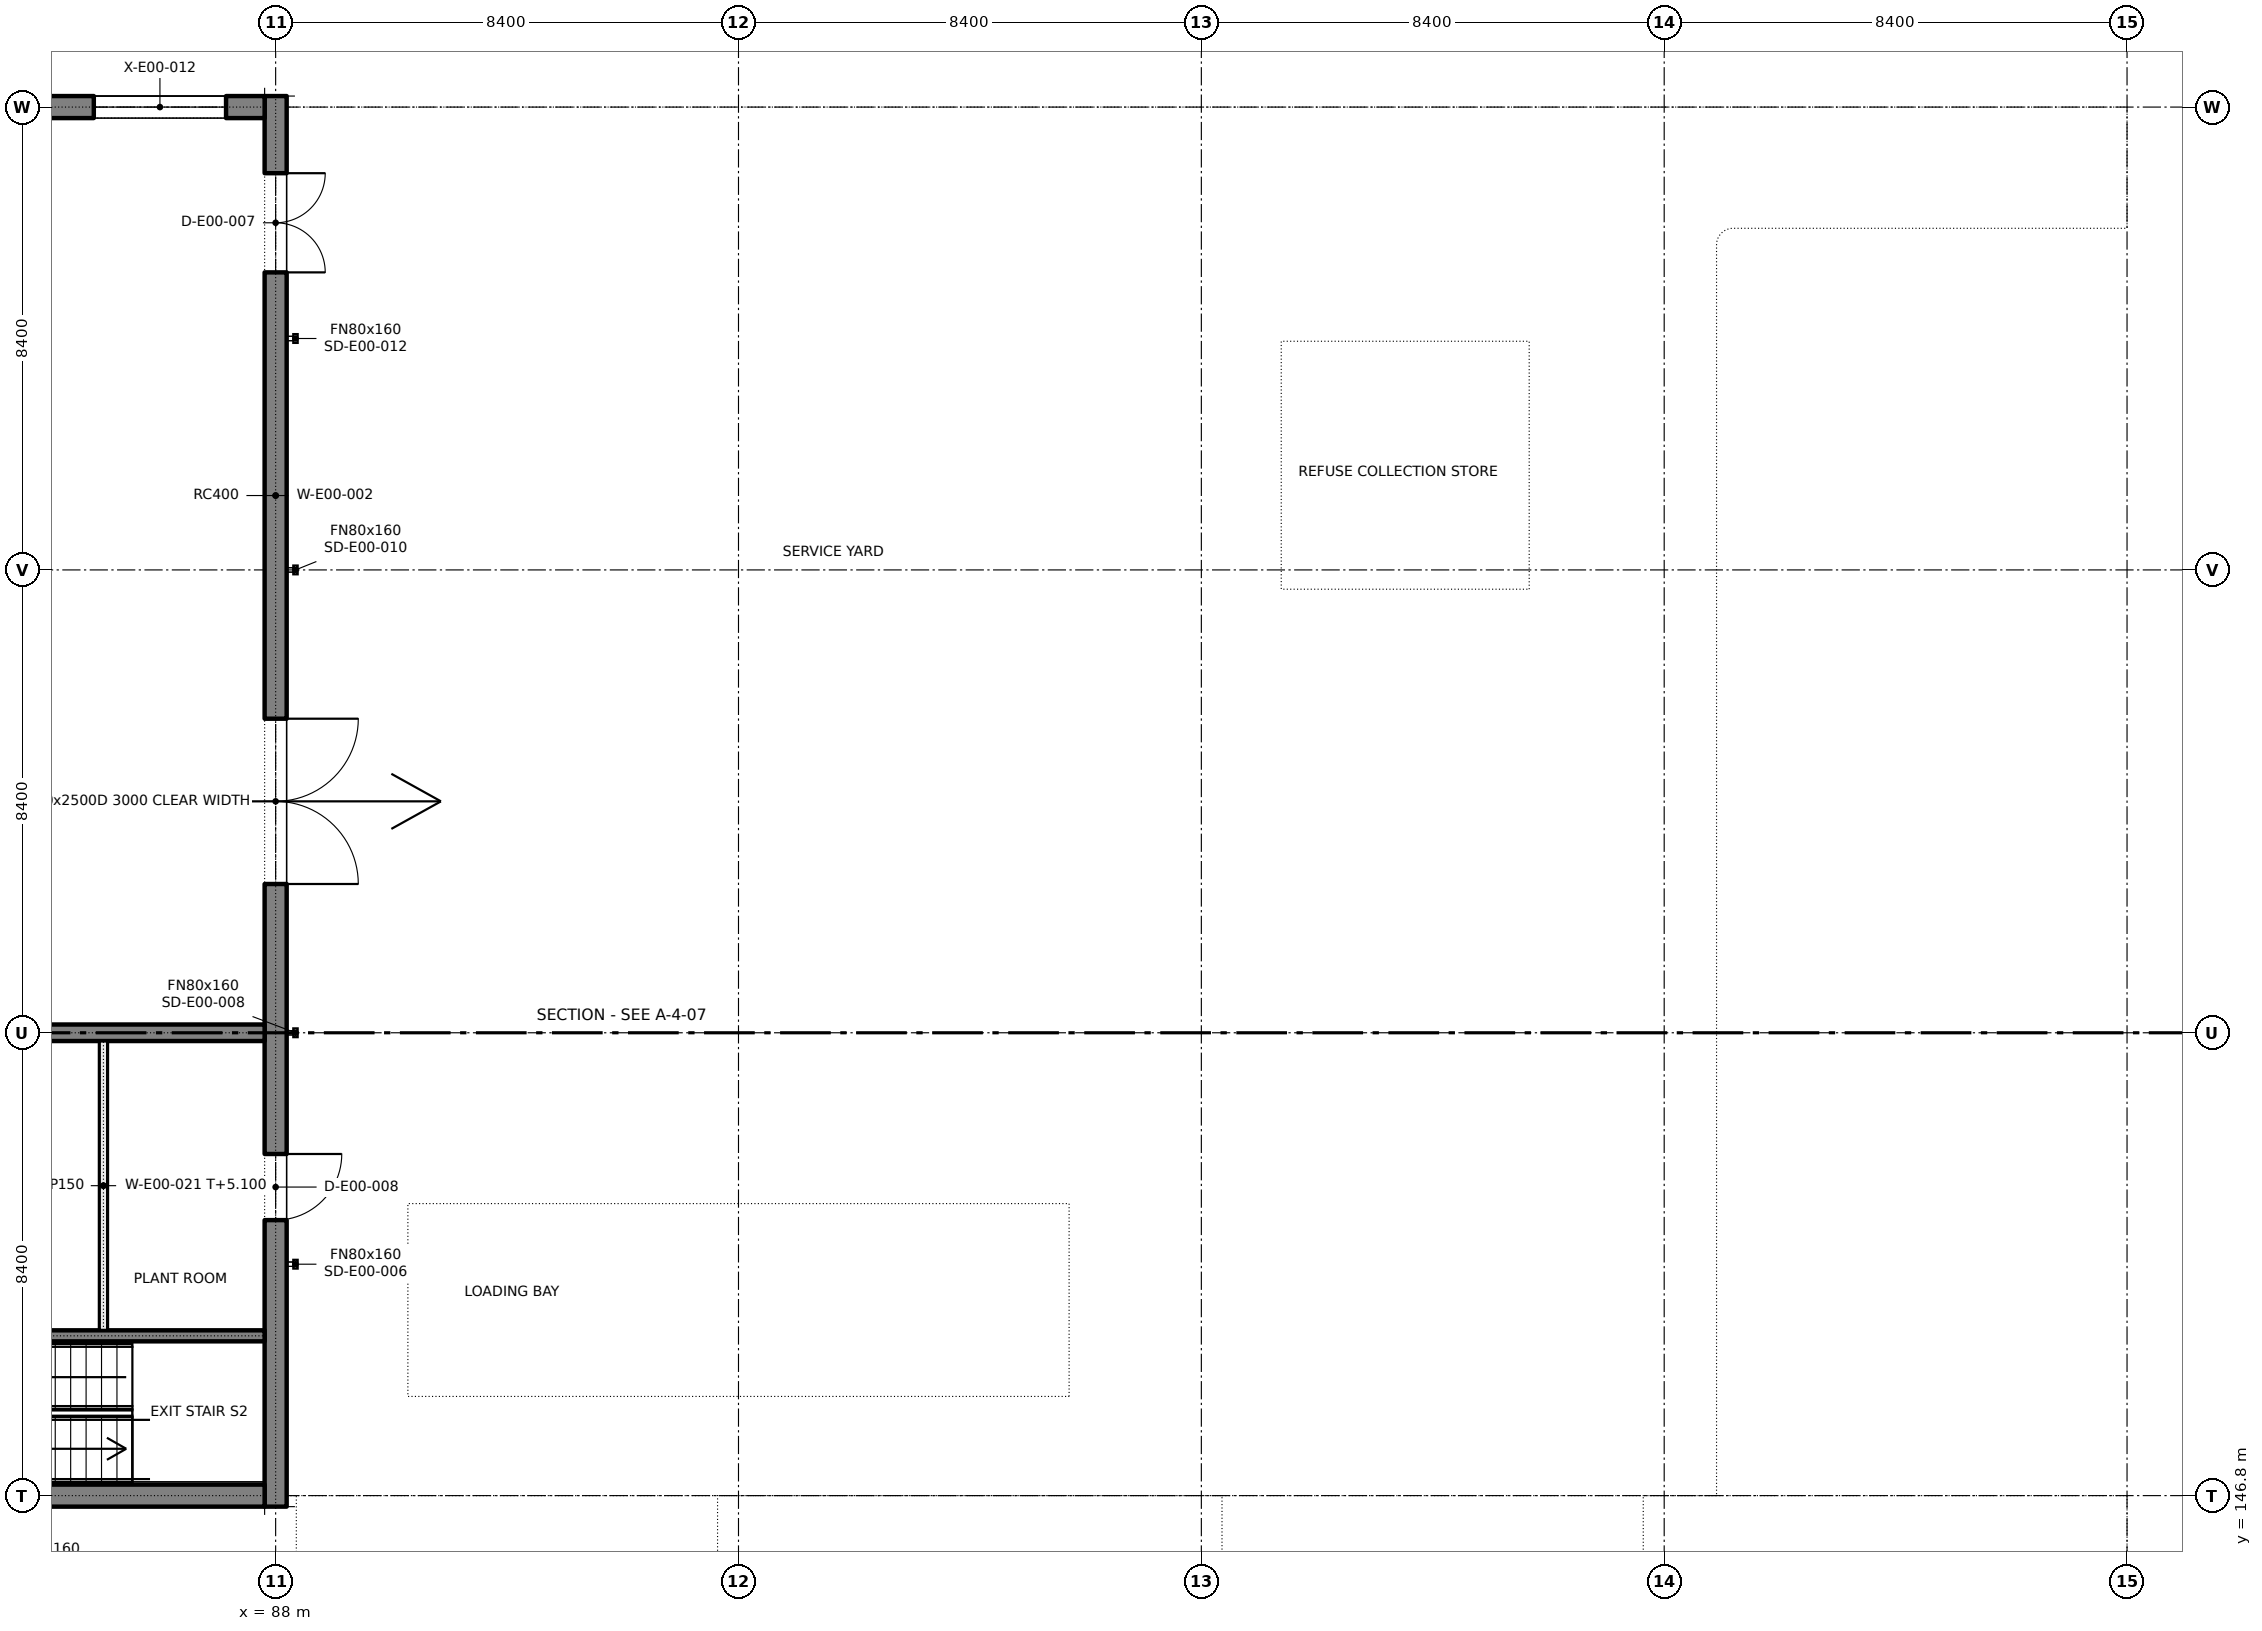
"""IFC4 building model, lengths in metres.
Left out: names, types, materials, properties, quantities, classifications, styles, units other than length and angle.
Written with IfcOpenShell. Run it as: python <this file> out.ifc"""

import sys

from ifc_helpers import new_model, si_unit, direction, frame, frame_2d, origin, place, context, subcontext, project, spatial, rectangle, extrude, element, fill, save


model = new_model("IFC4")
c1 = context("Model", 3, precision=1e-05, world=origin(), true_north=direction((0.0, 1.0)))
c2 = subcontext(c1, "Body", "Model", "MODEL_VIEW")
j1 = project(units=[si_unit("LENGTHUNIT", "METRE"), si_unit("PLANEANGLEUNIT", "RADIAN")], contexts=[c1])
p1 = place(None, origin())
s1 = spatial("IfcSite", under=j1, at=p1, CompositionType="ELEMENT")
p2 = place(p1, origin())
s2 = spatial("IfcBuilding", under=s1, at=p2, CompositionType="ELEMENT")
p3 = place(p2, origin())
s3 = spatial("IfcBuildingStorey", under=s2, at=p3, CompositionType="ELEMENT", Elevation=0.0)
p4 = place(p3, frame((88.0, 146.6, 0.0), z_axis=(0.0, 0.0, 1.0), x_axis=(0.0, 1.0, 0.0)))
e1 = element("IfcWall", 1, at=p4, inside=s3, PredefinedType="SOLIDWALL", context=c2, shape_type="SweptSolid", body=[
    extrude(rectangle(XDim=25.6, YDim=0.4, at=frame_2d((12.8, 0.0))), origin(), (0.0, 0.0, 1.0), 5.4),
])
p5 = place(p4, frame((11.3, 0.0, 0.0)))
e2 = element("IfcOpeningElement", 2, at=p5, cuts=e1, PredefinedType="OPENING", context=c2, shape_type="SweptSolid", body=[
    extrude(rectangle(XDim=3.0, YDim=2.5, at=frame_2d((1.5, 1.25))), frame((0.0, 0.21, 0.0), z_axis=(0.0, -1.0, 0.0), x_axis=(1.0, 0.0, 0.0)), (0.0, 0.0, 1.0), 0.42),
])
p6 = place(p4, frame((22.4, 0.0, 0.0)))
e3 = element("IfcOpeningElement", 3, at=p6, cuts=e1, PredefinedType="OPENING", context=c2, shape_type="SweptSolid", body=[
    extrude(rectangle(XDim=1.8, YDim=2.1, at=frame_2d((0.9, 1.05))), frame((0.0, 0.21, 0.0), z_axis=(0.0, -1.0, 0.0), x_axis=(1.0, 0.0, 0.0)), (0.0, 0.0, 1.0), 0.42),
])
p7 = place(p4, frame((5.2, 0.0, 0.0)))
e4 = element("IfcOpeningElement", 4, at=p7, cuts=e1, PredefinedType="OPENING", context=c2, shape_type="SweptSolid", body=[
    extrude(rectangle(XDim=1.2, YDim=2.1, at=frame_2d((0.6, 1.05))), frame((0.0, 0.21, 0.0), z_axis=(0.0, -1.0, 0.0), x_axis=(1.0, 0.0, 0.0)), (0.0, 0.0, 1.0), 0.42),
])
p8 = place(p3, frame((63.0, 146.8, 0.0), z_axis=(0.0, 0.0, 1.0), x_axis=(1.0, 0.0, 0.0)))
e5 = element("IfcWall", 5, at=p8, inside=s3, PredefinedType="SOLIDWALL", context=c2, shape_type="SweptSolid", body=[
    extrude(rectangle(XDim=24.8, YDim=0.4, at=frame_2d((12.4, 0.0))), origin(), (0.0, 0.0, 1.0), 5.4),
])
p9 = place(p8, frame((10.9, 0.0, 0.0)))
e6 = element("IfcOpeningElement", 6, at=p9, cuts=e5, PredefinedType="OPENING", context=c2, shape_type="SweptSolid", body=[
    extrude(rectangle(XDim=3.0, YDim=2.5, at=frame_2d((1.5, 1.25))), frame((0.0, 0.21, 0.0), z_axis=(0.0, -1.0, 0.0), x_axis=(1.0, 0.0, 0.0)), (0.0, 0.0, 1.0), 0.42),
])
p10 = place(p8, frame((16.9, 0.0, 0.0)))
e7 = element("IfcOpeningElement", 7, at=p10, cuts=e5, PredefinedType="OPENING", context=c2, shape_type="SweptSolid", body=[
    extrude(rectangle(XDim=1.2, YDim=2.1, at=frame_2d((0.6, 1.05))), frame((0.0, 0.21, 0.0), z_axis=(0.0, -1.0, 0.0), x_axis=(1.0, 0.0, 0.0)), (0.0, 0.0, 1.0), 0.42),
])
p11 = place(p8, frame((0.7, 0.0, 0.9)))
e8 = element("IfcOpeningElement", 8, at=p11, cuts=e5, PredefinedType="OPENING", context=c2, shape_type="SweptSolid", body=[
    extrude(rectangle(XDim=2.4, YDim=2.4, at=frame_2d((1.2, 1.2))), frame((0.0, 0.21, 0.0), z_axis=(0.0, -1.0, 0.0), x_axis=(1.0, 0.0, 0.0)), (0.0, 0.0, 1.0), 0.42),
])
p12 = place(p8, frame((4.9, 0.0, 0.9)))
e9 = element("IfcOpeningElement", 9, at=p12, cuts=e5, PredefinedType="OPENING", context=c2, shape_type="SweptSolid", body=[
    extrude(rectangle(XDim=2.4, YDim=2.4, at=frame_2d((1.2, 1.2))), frame((0.0, 0.21, 0.0), z_axis=(0.0, -1.0, 0.0), x_axis=(1.0, 0.0, 0.0)), (0.0, 0.0, 1.0), 0.42),
])
p13 = place(p8, frame((8.5, 0.0, 0.9)))
e10 = element("IfcOpeningElement", 10, at=p13, cuts=e5, PredefinedType="OPENING", context=c2, shape_type="SweptSolid", body=[
    extrude(rectangle(XDim=2.1, YDim=2.4, at=frame_2d((1.05, 1.2))), frame((0.0, 0.21, 0.0), z_axis=(0.0, -1.0, 0.0), x_axis=(1.0, 0.0, 0.0)), (0.0, 0.0, 1.0), 0.42),
])
p14 = place(p8, frame((14.2, 0.0, 0.9)))
e11 = element("IfcOpeningElement", 11, at=p14, cuts=e5, PredefinedType="OPENING", context=c2, shape_type="SweptSolid", body=[
    extrude(rectangle(XDim=2.1, YDim=2.4, at=frame_2d((1.05, 1.2))), frame((0.0, 0.21, 0.0), z_axis=(0.0, -1.0, 0.0), x_axis=(1.0, 0.0, 0.0)), (0.0, 0.0, 1.0), 0.42),
])
p15 = place(p3, frame((63.0, 172.0, 0.0), z_axis=(0.0, 0.0, 1.0), x_axis=(1.0, 0.0, 0.0)))
e12 = element("IfcWall", 12, at=p15, inside=s3, PredefinedType="SOLIDWALL", context=c2, shape_type="SweptSolid", body=[
    extrude(rectangle(XDim=24.8, YDim=0.4, at=frame_2d((12.4, 0.0))), origin(), (0.0, 0.0, 1.0), 5.4),
])
p16 = place(p15, frame((9.1, 0.0, 0.9)))
e13 = element("IfcOpeningElement", 13, at=p16, cuts=e12, PredefinedType="OPENING", context=c2, shape_type="SweptSolid", body=[
    extrude(rectangle(XDim=2.4, YDim=2.4, at=frame_2d((1.2, 1.2))), frame((0.0, 0.21, 0.0), z_axis=(0.0, -1.0, 0.0), x_axis=(1.0, 0.0, 0.0)), (0.0, 0.0, 1.0), 0.42),
])
p17 = place(p15, frame((13.3, 0.0, 0.9)))
e14 = element("IfcOpeningElement", 14, at=p17, cuts=e12, PredefinedType="OPENING", context=c2, shape_type="SweptSolid", body=[
    extrude(rectangle(XDim=2.4, YDim=2.4, at=frame_2d((1.2, 1.2))), frame((0.0, 0.21, 0.0), z_axis=(0.0, -1.0, 0.0), x_axis=(1.0, 0.0, 0.0)), (0.0, 0.0, 1.0), 0.42),
])
p18 = place(p15, frame((17.5, 0.0, 0.9)))
e15 = element("IfcOpeningElement", 15, at=p18, cuts=e12, PredefinedType="OPENING", context=c2, shape_type="SweptSolid", body=[
    extrude(rectangle(XDim=2.4, YDim=2.4, at=frame_2d((1.2, 1.2))), frame((0.0, 0.21, 0.0), z_axis=(0.0, -1.0, 0.0), x_axis=(1.0, 0.0, 0.0)), (0.0, 0.0, 1.0), 0.42),
])
p19 = place(p15, frame((21.7, 0.0, 0.9)))
e16 = element("IfcOpeningElement", 16, at=p19, cuts=e12, PredefinedType="OPENING", context=c2, shape_type="SweptSolid", body=[
    extrude(rectangle(XDim=2.4, YDim=2.4, at=frame_2d((1.2, 1.2))), frame((0.0, 0.21, 0.0), z_axis=(0.0, -1.0, 0.0), x_axis=(1.0, 0.0, 0.0)), (0.0, 0.0, 1.0), 0.42),
])
p20 = place(p3, frame((71.25, 155.2, 0.0), z_axis=(0.0, 0.0, 1.0), x_axis=(1.0, 0.0, 0.0)))
e17 = element("IfcWall", 17, at=p20, inside=s3, PredefinedType="SOLIDWALL", context=c2, shape_type="SweptSolid", body=[
    extrude(rectangle(XDim=16.55, YDim=0.3, at=frame_2d((8.275, 0.0))), origin(), (0.0, 0.0, 1.0), 5.4),
])
p21 = place(p20, frame((2.95, 0.0, 0.0)))
e18 = element("IfcOpeningElement", 18, at=p21, cuts=e17, PredefinedType="OPENING", context=c2, shape_type="SweptSolid", body=[
    extrude(rectangle(XDim=2.4, YDim=2.1, at=frame_2d((1.2, 1.05))), frame((0.0, 0.16, 0.0), z_axis=(0.0, -1.0, 0.0), x_axis=(1.0, 0.0, 0.0)), (0.0, 0.0, 1.0), 0.32),
])
p22 = place(p20, frame((9.85, 0.0, 0.0)))
e19 = element("IfcOpeningElement", 19, at=p22, cuts=e17, PredefinedType="OPENING", context=c2, shape_type="SweptSolid", body=[
    extrude(rectangle(XDim=2.4, YDim=2.1, at=frame_2d((1.2, 1.05))), frame((0.0, 0.16, 0.0), z_axis=(0.0, -1.0, 0.0), x_axis=(1.0, 0.0, 0.0)), (0.0, 0.0, 1.0), 0.32),
])
p23 = place(p3, frame((79.8, 149.7, 0.0), z_axis=(0.0, 0.0, 1.0), x_axis=(1.0, 0.0, 0.0)))
e20 = element("IfcWall", 20, at=p23, inside=s3, PredefinedType="SOLIDWALL", context=c2, shape_type="SweptSolid", body=[
    extrude(rectangle(XDim=8.0, YDim=0.2, at=frame_2d((4.0, 0.0))), origin(), (0.0, 0.0, 1.0), 5.4),
])
p24 = place(p3, frame((88.5, 145.825, 0.0), z_axis=(0.0, 0.0, 1.0), x_axis=(1.0, 0.0, 0.0)))
e21 = element("IfcWall", 21, at=p24, inside=s3, PredefinedType="SOLIDWALL", context=c2, shape_type="SweptSolid", body=[
    extrude(rectangle(XDim=7.395, YDim=0.25, at=frame_2d((3.698, 0.0))), origin(), (0.0, 0.0, 1.0), 2.8),
])
for number, where, z_axis, x_axis in (
    (22, (88.5, 142.325, 0.0), (0.0, 0.0, 1.0), (0.0, 1.0, 0.0)),
    (23, (95.895, 142.325, 0.0), (0.0, 0.0, 1.0), (0.0, 1.0, 0.0)),
):
    element("IfcWall", number, at=place(p3, frame(where, z_axis=z_axis, x_axis=x_axis)), inside=s3, PredefinedType="SOLIDWALL", context=c2, shape_type="SweptSolid", body=[
        extrude(rectangle(XDim=3.5, YDim=0.25, at=frame_2d((1.75, 0.0))), origin(), (0.0, 0.0, 1.0), 2.8),
    ])
p25 = place(p3, frame((105.3, 145.825, 0.0), z_axis=(0.0, 0.0, 1.0), x_axis=(1.0, 0.0, 0.0)))
e24 = element("IfcWall", 24, at=p25, inside=s3, PredefinedType="SOLIDWALL", context=c2, shape_type="SweptSolid", body=[
    extrude(rectangle(XDim=7.395, YDim=0.25, at=frame_2d((3.698, 0.0))), origin(), (0.0, 0.0, 1.0), 2.8),
])
for number, where, z_axis, x_axis in (
    (25, (105.3, 142.325, 0.0), (0.0, 0.0, 1.0), (0.0, 1.0, 0.0)),
    (26, (112.695, 142.325, 0.0), (0.0, 0.0, 1.0), (0.0, 1.0, 0.0)),
):
    element("IfcWall", number, at=place(p3, frame(where, z_axis=z_axis, x_axis=x_axis)), inside=s3, PredefinedType="SOLIDWALL", context=c2, shape_type="SweptSolid", body=[
        extrude(rectangle(XDim=3.5, YDim=0.25, at=frame_2d((1.75, 0.0))), origin(), (0.0, 0.0, 1.0), 2.8),
    ])
p26 = place(p3, frame((114.05, 172.0, 0.0), z_axis=(0.0, 0.0, 1.0), x_axis=(1.0, 0.0, 0.0)))
e27 = element("IfcWall", 27, at=p26, inside=s3, PredefinedType="SOLIDWALL", context=c2, shape_type="SweptSolid", body=[
    extrude(rectangle(XDim=7.8, YDim=0.5, at=frame_2d((3.9, 0.0))), origin(), (0.0, 0.0, 1.0), 3.2),
])
p27 = place(p26, frame((0.8, 0.0, 0.0)))
e28 = element("IfcOpeningElement", 28, at=p27, cuts=e27, PredefinedType="OPENING", context=c2, shape_type="SweptSolid", body=[
    extrude(rectangle(XDim=6.5, YDim=2.4, at=frame_2d((3.25, 1.2))), frame((0.0, 0.26, 0.0), z_axis=(0.0, -1.0, 0.0), x_axis=(1.0, 0.0, 0.0)), (0.0, 0.0, 1.0), 0.52),
])
p28 = place(p3, frame((106.125, 163.125, 0.0), z_axis=(0.0, 0.0, 1.0), x_axis=(1.0, 0.0, 0.0)))
e29 = element("IfcWall", 29, at=p28, inside=s3, PredefinedType="SOLIDWALL", context=c2, shape_type="SweptSolid", body=[
    extrude(rectangle(XDim=4.75, YDim=0.25, at=frame_2d((2.375, 0.0))), origin(), (0.0, 0.0, 1.0), 2.6),
])
p29 = place(p28, frame((1.775, 0.0, 0.0)))
e30 = element("IfcOpeningElement", 30, at=p29, cuts=e29, PredefinedType="OPENING", context=c2, shape_type="SweptSolid", body=[
    extrude(rectangle(XDim=1.2, YDim=2.1, at=frame_2d((0.6, 1.05))), frame((0.0, 0.135, 0.0), z_axis=(0.0, -1.0, 0.0), x_axis=(1.0, 0.0, 0.0)), (0.0, 0.0, 1.0), 0.27),
])
for number, where, z_axis, x_axis in (
    (31, (106.125, 167.875, 0.0), (0.0, 0.0, 1.0), (1.0, 0.0, 0.0)),
    (32, (106.125, 163.125, 0.0), (0.0, 0.0, 1.0), (0.0, 1.0, 0.0)),
    (33, (110.875, 163.125, 0.0), (0.0, 0.0, 1.0), (0.0, 1.0, 0.0)),
):
    element("IfcWall", number, at=place(p3, frame(where, z_axis=z_axis, x_axis=x_axis)), inside=s3, PredefinedType="SOLIDWALL", context=c2, shape_type="SweptSolid", body=[
        extrude(rectangle(XDim=4.75, YDim=0.25, at=frame_2d((2.375, 0.0))), origin(), (0.0, 0.0, 1.0), 2.6),
    ])
p30 = place(p3, frame((114.07, 172.0, -0.3), z_axis=(0.0, 0.0, 1.0), x_axis=(1.0, 0.0, 0.0)))
e34 = element("IfcWall", 34, at=p30, inside=s3, PredefinedType="SOLIDWALL", context=c2, shape_type="SweptSolid", body=[
    extrude(rectangle(XDim=7.76, YDim=0.5, at=frame_2d((3.88, 0.0))), origin(), (0.0, 0.0, 1.0), 0.3),
])
for number, where, z_axis, x_axis in (
    (35, (106.145, 163.125, -0.3), (0.0, 0.0, 1.0), (1.0, 0.0, 0.0)),
    (36, (109.12, 163.125, -0.3), (0.0, 0.0, 1.0), (1.0, 0.0, 0.0)),
):
    element("IfcWall", number, at=place(p3, frame(where, z_axis=z_axis, x_axis=x_axis)), inside=s3, PredefinedType="SOLIDWALL", context=c2, shape_type="SweptSolid", body=[
        extrude(rectangle(XDim=1.735, YDim=0.25, at=frame_2d((0.867, 0.0))), origin(), (0.0, 0.0, 1.0), 0.3),
    ])
p31 = place(p3, frame((106.145, 167.875, -0.3), z_axis=(0.0, 0.0, 1.0), x_axis=(1.0, 0.0, 0.0)))
e37 = element("IfcWall", 37, at=p31, inside=s3, PredefinedType="SOLIDWALL", context=c2, shape_type="SweptSolid", body=[
    extrude(rectangle(XDim=4.71, YDim=0.25, at=frame_2d((2.355, 0.0))), origin(), (0.0, 0.0, 1.0), 0.3),
])
for number, where, z_axis, x_axis in (
    (38, (106.125, 163.895, -0.3), (0.0, 0.0, 1.0), (0.0, 1.0, 0.0)),
    (39, (110.875, 163.895, -0.3), (0.0, 0.0, 1.0), (0.0, 1.0, 0.0)),
):
    element("IfcWall", number, at=place(p3, frame(where, z_axis=z_axis, x_axis=x_axis)), inside=s3, PredefinedType="SOLIDWALL", context=c2, shape_type="SweptSolid", body=[
        extrude(rectangle(XDim=3.21, YDim=0.25, at=frame_2d((1.605, 0.0))), origin(), (0.0, 0.0, 1.0), 0.3),
    ])
p32 = place(p3, frame((84.875, 149.8, 0.0), z_axis=(0.0, 0.0, 1.0), x_axis=(0.0, 1.0, 0.0)))
e40 = element("IfcWall", 40, at=p32, inside=s3, PredefinedType="PARTITIONING", context=c2, shape_type="SweptSolid", body=[
    extrude(rectangle(XDim=5.25, YDim=0.15, at=frame_2d((2.625, 0.0))), origin(), (0.0, 0.0, 1.0), 5.1),
])
p33 = place(p27, frame((6.5, 0.0, 0.0), z_axis=(0.0, 0.0, 1.0), x_axis=(-1.0, 0.0, 0.0)))
e41 = element("IfcDoor", 41, at=p33, inside=s3, OperationType="ROLLINGUP", PredefinedType="DOOR", context=c2, shape_type="SweptSolid", body=[
    extrude(rectangle(XDim=6.5, YDim=2.4, at=frame_2d((3.25, 1.2))), frame((0.0, 0.025, 0.0), z_axis=(0.0, -1.0, 0.0), x_axis=(1.0, 0.0, 0.0)), (0.0, 0.0, 1.0), 0.05),
])
fill(e28, e41)
p34 = place(p29, frame((1.2, 0.0, 0.0), z_axis=(0.0, 0.0, 1.0), x_axis=(-1.0, 0.0, 0.0)))
e42 = element("IfcDoor", 42, at=p34, inside=s3, OperationType="SINGLE_SWING_LEFT", PredefinedType="DOOR", context=c2, shape_type="SweptSolid", body=[
    extrude(rectangle(XDim=1.2, YDim=2.1, at=frame_2d((0.6, 1.05))), frame((0.0, 0.025, 0.0), z_axis=(0.0, -1.0, 0.0), x_axis=(1.0, 0.0, 0.0)), (0.0, 0.0, 1.0), 0.05),
])
fill(e30, e42)
p35 = place(p5, frame((3.0, 0.0, 0.0), z_axis=(0.0, 0.0, 1.0), x_axis=(-1.0, 0.0, 0.0)))
e43 = element("IfcDoor", 43, at=p35, inside=s3, OperationType="DOUBLE_DOOR_SINGLE_SWING", PredefinedType="DOOR", context=c2, shape_type="SweptSolid", body=[
    extrude(rectangle(XDim=3.0, YDim=2.5, at=frame_2d((1.5, 1.25))), frame((0.0, 0.025, 0.0), z_axis=(0.0, -1.0, 0.0), x_axis=(1.0, 0.0, 0.0)), (0.0, 0.0, 1.0), 0.05),
])
fill(e2, e43)
p36 = place(p6, frame((1.8, 0.0, 0.0), z_axis=(0.0, 0.0, 1.0), x_axis=(-1.0, 0.0, 0.0)))
e44 = element("IfcDoor", 44, at=p36, inside=s3, OperationType="DOUBLE_DOOR_SINGLE_SWING", PredefinedType="DOOR", context=c2, shape_type="SweptSolid", body=[
    extrude(rectangle(XDim=1.8, YDim=2.1, at=frame_2d((0.9, 1.05))), frame((0.0, 0.025, 0.0), z_axis=(0.0, -1.0, 0.0), x_axis=(1.0, 0.0, 0.0)), (0.0, 0.0, 1.0), 0.05),
])
fill(e3, e44)
p37 = place(p7, frame((1.2, 0.0, 0.0), z_axis=(0.0, 0.0, 1.0), x_axis=(-1.0, 0.0, 0.0)))
e45 = element("IfcDoor", 45, at=p37, inside=s3, OperationType="SINGLE_SWING_LEFT", PredefinedType="DOOR", context=c2, shape_type="SweptSolid", body=[
    extrude(rectangle(XDim=1.2, YDim=2.1, at=frame_2d((0.6, 1.05))), frame((0.0, 0.025, 0.0), z_axis=(0.0, -1.0, 0.0), x_axis=(1.0, 0.0, 0.0)), (0.0, 0.0, 1.0), 0.05),
])
fill(e4, e45)
p38 = place(p19, origin())
e46 = element("IfcWindow", 46, at=p38, inside=s3, PartitioningType="SINGLE_PANEL", PredefinedType="WINDOW", context=c2, shape_type="SweptSolid", body=[
    extrude(rectangle(XDim=2.4, YDim=2.4, at=frame_2d((1.2, 1.2))), frame((0.0, 0.03, 0.0), z_axis=(0.0, -1.0, 0.0), x_axis=(1.0, 0.0, 0.0)), (0.0, 0.0, 1.0), 0.06),
])
fill(e16, e46)
save(model, sys.argv[1])
